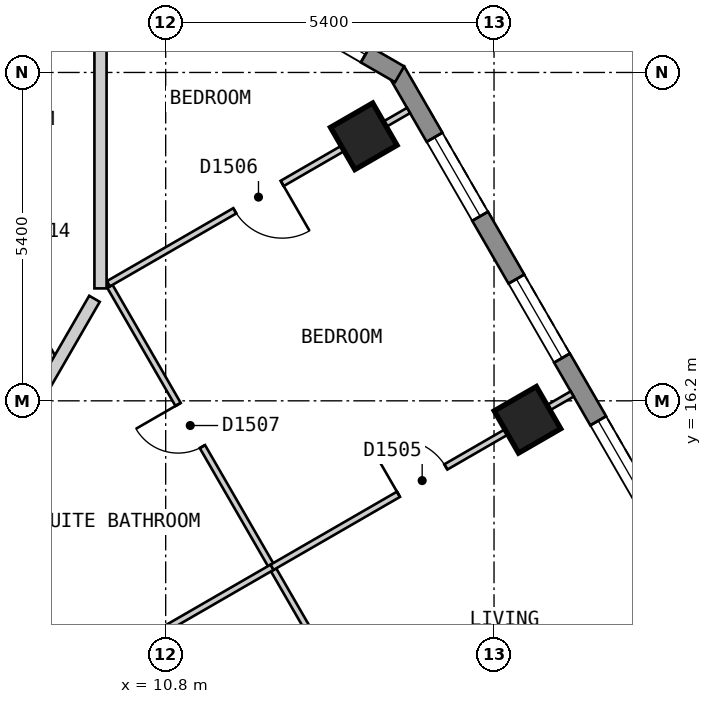
"""IFC4 building model, lengths in metres.
Left out: names, types, materials, properties, quantities, classifications, styles, units other than length and angle.
Written with IfcOpenShell. Run it as: python <this file> out.ifc"""

import sys

from ifc_helpers import new_model, si_unit, direction, frame, frame_2d, origin, origin_2d, place, context, subcontext, project, spatial, polyline, rectangle, outline, extrude, element, fill, save


model = new_model("IFC4")
c1 = context("Model", 3, precision=1e-05, world=origin(), true_north=direction((0.0, 1.0)))
c2 = subcontext(c1, "Body", "Model", "MODEL_VIEW")
j1 = project(units=[si_unit("LENGTHUNIT", "METRE"), si_unit("PLANEANGLEUNIT", "RADIAN")], contexts=[c1])
p1 = place(None, origin())
s1 = spatial("IfcSite", under=j1, at=p1, CompositionType="ELEMENT")
p2 = place(p1, origin())
s2 = spatial("IfcBuilding", under=s1, at=p2, CompositionType="ELEMENT")
p3 = place(p2, frame((0.0, 0.0, 184.2)))
s3 = spatial("IfcBuildingStorey", under=s2, at=p3, CompositionType="ELEMENT", Elevation=184.2)
for number, where, z_axis, x_axis in (
    (1, (16.75, 15.888, 0.0), (0.0, 0.0, 1.0), (-0.5, 0.866, 0.0)),
    (2, (14.058, 20.55, 0.0), (0.0, 0.0, 1.0), (-0.5, 0.866, 0.0)),
):
    element("IfcColumn", number, at=place(p3, frame(where, z_axis=z_axis, x_axis=x_axis)), inside=s3, PredefinedType="COLUMN", context=c2, shape_type="SweptSolid", body=[
        extrude(rectangle(XDim=0.8, YDim=0.8, at=origin_2d()), origin(), (0.0, 0.0, 1.0), 3.0),
    ])
p4 = place(p3, frame((26.024, 1.825, 0.0), z_axis=(0.0, 0.0, 1.0), x_axis=(-0.500010537973, 0.866019319597, 0.0)))
e3 = element("IfcWall", 3, at=p4, inside=s3, PredefinedType="SOLIDWALL", context=c2, shape_type="SweptSolid", body=[
    extrude(outline(polyline([(0.0, -0.15), (22.863, -0.15), (22.783, 0.15), (0.08, 0.15), (0.0, -0.15)])), origin(), (0.0, 0.0, 1.0), 2.7),
])
p5 = place(p4, frame((1.259, 0.0, 0.15)))
e4 = element("IfcOpeningElement", 4, at=p5, cuts=e3, PredefinedType="OPENING", context=c2, shape_type="SweptSolid", body=[
    extrude(rectangle(XDim=1.5, YDim=2.1, at=frame_2d((0.75, 1.05))), frame((0.0, 0.16, 0.0), z_axis=(0.0, -1.0, 0.0), x_axis=(1.0, 0.0, 0.0)), (0.0, 0.0, 1.0), 0.32),
])
p6 = place(p4, frame((3.952, 0.0, 0.15)))
e5 = element("IfcOpeningElement", 5, at=p6, cuts=e3, PredefinedType="OPENING", context=c2, shape_type="SweptSolid", body=[
    extrude(rectangle(XDim=1.5, YDim=2.1, at=frame_2d((0.75, 1.05))), frame((0.0, 0.16, 0.0), z_axis=(0.0, -1.0, 0.0), x_axis=(1.0, 0.0, 0.0)), (0.0, 0.0, 1.0), 0.32),
])
p7 = place(p4, frame((6.644, 0.0, 0.15)))
e6 = element("IfcOpeningElement", 6, at=p7, cuts=e3, PredefinedType="OPENING", context=c2, shape_type="SweptSolid", body=[
    extrude(rectangle(XDim=1.5, YDim=2.1, at=frame_2d((0.75, 1.05))), frame((0.0, 0.16, 0.0), z_axis=(0.0, -1.0, 0.0), x_axis=(1.0, 0.0, 0.0)), (0.0, 0.0, 1.0), 0.32),
])
p8 = place(p4, frame((9.335, 0.0, 0.15)))
e7 = element("IfcOpeningElement", 7, at=p8, cuts=e3, PredefinedType="OPENING", context=c2, shape_type="SweptSolid", body=[
    extrude(rectangle(XDim=1.5, YDim=2.1, at=frame_2d((0.75, 1.05))), frame((0.0, 0.16, 0.0), z_axis=(0.0, -1.0, 0.0), x_axis=(1.0, 0.0, 0.0)), (0.0, 0.0, 1.0), 0.32),
])
p9 = place(p4, frame((12.028, 0.0, 0.15)))
e8 = element("IfcOpeningElement", 8, at=p9, cuts=e3, PredefinedType="OPENING", context=c2, shape_type="SweptSolid", body=[
    extrude(rectangle(XDim=1.5, YDim=2.1, at=frame_2d((0.75, 1.05))), frame((0.0, 0.16, 0.0), z_axis=(0.0, -1.0, 0.0), x_axis=(1.0, 0.0, 0.0)), (0.0, 0.0, 1.0), 0.32),
])
p10 = place(p4, frame((14.72, 0.0, 0.15)))
e9 = element("IfcOpeningElement", 9, at=p10, cuts=e3, PredefinedType="OPENING", context=c2, shape_type="SweptSolid", body=[
    extrude(rectangle(XDim=1.5, YDim=2.1, at=frame_2d((0.75, 1.05))), frame((0.0, 0.16, 0.0), z_axis=(0.0, -1.0, 0.0), x_axis=(1.0, 0.0, 0.0)), (0.0, 0.0, 1.0), 0.32),
])
p11 = place(p4, frame((17.411, 0.0, 0.15)))
e10 = element("IfcOpeningElement", 10, at=p11, cuts=e3, PredefinedType="OPENING", context=c2, shape_type="SweptSolid", body=[
    extrude(rectangle(XDim=1.5, YDim=2.1, at=frame_2d((0.75, 1.05))), frame((0.0, 0.16, 0.0), z_axis=(0.0, -1.0, 0.0), x_axis=(1.0, 0.0, 0.0)), (0.0, 0.0, 1.0), 0.32),
])
p12 = place(p4, frame((20.104, 0.0, 0.15)))
e11 = element("IfcOpeningElement", 11, at=p12, cuts=e3, PredefinedType="OPENING", context=c2, shape_type="SweptSolid", body=[
    extrude(rectangle(XDim=1.5, YDim=2.1, at=frame_2d((0.75, 1.05))), frame((0.0, 0.16, 0.0), z_axis=(0.0, -1.0, 0.0), x_axis=(1.0, 0.0, 0.0)), (0.0, 0.0, 1.0), 0.32),
])
p13 = place(p3, frame((14.647, 21.57, 0.0), z_axis=(0.0, 0.0, 1.0), x_axis=(-0.866022959057, 0.500004234368, 0.0)))
e12 = element("IfcWall", 12, at=p13, inside=s3, PredefinedType="SOLIDWALL", context=c2, shape_type="SweptSolid", body=[
    extrude(outline(polyline([(0.0, -0.15), (5.0, -0.15), (4.92, 0.15), (0.08, 0.15), (0.0, -0.15)])), origin(), (0.0, 0.0, 1.0), 2.7),
])
p14 = place(p13, frame((0.65, 0.0, 0.15)))
e13 = element("IfcOpeningElement", 13, at=p14, cuts=e12, PredefinedType="OPENING", context=c2, shape_type="SweptSolid", body=[
    extrude(rectangle(XDim=1.2, YDim=2.1, at=frame_2d((0.6, 1.05))), frame((0.0, 0.16, 0.0), z_axis=(0.0, -1.0, 0.0), x_axis=(1.0, 0.0, 0.0)), (0.0, 0.0, 1.0), 0.32),
])
p15 = place(p13, frame((3.15, 0.0, 0.15)))
e14 = element("IfcOpeningElement", 14, at=p15, cuts=e12, PredefinedType="OPENING", context=c2, shape_type="SweptSolid", body=[
    extrude(rectangle(XDim=1.2, YDim=2.1, at=frame_2d((0.6, 1.05))), frame((0.0, 0.16, 0.0), z_axis=(0.0, -1.0, 0.0), x_axis=(1.0, 0.0, 0.0)), (0.0, 0.0, 1.0), 0.32),
])
p16 = place(p3, frame((5.485, 17.3, 0.0), z_axis=(0.0, 0.0, 1.0), x_axis=(0.499998905622, -0.866026035623, 0.0)))
e15 = element("IfcWall", 15, at=p16, inside=s3, PredefinedType="PARTITIONING", context=c2, shape_type="SweptSolid", body=[
    extrude(rectangle(XDim=10.524, YDim=0.2, at=frame_2d((5.262, 0.0))), origin(), (0.0, 0.0, 1.0), 2.7),
])
p17 = place(p16, frame((8.974, 0.0, 0.0)))
e16 = element("IfcOpeningElement", 16, at=p17, cuts=e15, PredefinedType="OPENING", context=c2, shape_type="SweptSolid", body=[
    extrude(rectangle(XDim=1.0, YDim=2.1, at=frame_2d((0.5, 1.05))), frame((0.0, 0.11, 0.0), z_axis=(0.0, -1.0, 0.0), x_axis=(1.0, 0.0, 0.0)), (0.0, 0.0, 1.0), 0.22),
])
p18 = place(p3, frame((7.073, 20.15, 0.0), z_axis=(0.0, 0.0, 1.0), x_axis=(0.499917691695, -0.866072919292, 0.0)))
e17 = element("IfcWall", 17, at=p18, inside=s3, PredefinedType="PARTITIONING", context=c2, shape_type="SweptSolid", body=[
    extrude(rectangle(XDim=3.753, YDim=0.1, at=frame_2d((1.876, 0.0))), origin(), (0.0, 0.0, 1.0), 2.7),
])
p19 = place(p18, frame((0.96, 0.0, 0.0)))
e18 = element("IfcOpeningElement", 18, at=p19, cuts=e17, PredefinedType="OPENING", context=c2, shape_type="SweptSolid", body=[
    extrude(rectangle(XDim=0.8, YDim=2.1, at=frame_2d((0.4, 1.05))), frame((0.0, 0.06, 0.0), z_axis=(0.0, -1.0, 0.0), x_axis=(1.0, 0.0, 0.0)), (0.0, 0.0, 1.0), 0.12),
])
p20 = place(p3, frame((9.883, 18.082, 0.0), z_axis=(0.0, 0.0, 1.0), x_axis=(0.500004428835, -0.86602284678, 0.0)))
e19 = element("IfcWall", 19, at=p20, inside=s3, PredefinedType="PARTITIONING", context=c2, shape_type="SweptSolid", body=[
    extrude(rectangle(XDim=10.618, YDim=0.1, at=frame_2d((5.309, 0.0))), origin(), (0.0, 0.0, 1.0), 2.7),
])
p21 = place(p20, frame((7.657, 0.0, 0.0)))
e20 = element("IfcOpeningElement", 20, at=p21, cuts=e19, PredefinedType="OPENING", context=c2, shape_type="SweptSolid", body=[
    extrude(rectangle(XDim=0.9, YDim=2.1, at=frame_2d((0.45, 1.05))), frame((0.0, 0.06, 0.0), z_axis=(0.0, -1.0, 0.0), x_axis=(1.0, 0.0, 0.0)), (0.0, 0.0, 1.0), 0.12),
])
p22 = place(p20, frame((2.242, 0.0, 0.0)))
e21 = element("IfcOpeningElement", 21, at=p22, cuts=e19, PredefinedType="OPENING", context=c2, shape_type="SweptSolid", body=[
    extrude(rectangle(XDim=0.8, YDim=2.1, at=frame_2d((0.4, 1.05))), frame((0.0, 0.06, 0.0), z_axis=(0.0, -1.0, 0.0), x_axis=(1.0, 0.0, 0.0)), (0.0, 0.0, 1.0), 0.12),
])
p23 = place(p3, frame((8.999, 11.413, 0.0), z_axis=(0.0, 0.0, 1.0), x_axis=(0.86606561423, 0.499930346997, 0.0)))
e22 = element("IfcWall", 22, at=p23, inside=s3, PredefinedType="PARTITIONING", context=c2, shape_type="SweptSolid", body=[
    extrude(rectangle(XDim=4.1, YDim=0.1, at=frame_2d((2.05, 0.0))), origin(), (0.0, 0.0, 1.0), 2.7),
])
p24 = place(p3, frame((9.858, 18.125, 0.0), z_axis=(0.0, 0.0, 1.0), x_axis=(0.866004402611, 0.500036373335, 0.0)))
e23 = element("IfcWall", 23, at=p24, inside=s3, PredefinedType="PARTITIONING", context=c2, shape_type="SweptSolid", body=[
    extrude(rectangle(XDim=5.7, YDim=0.1, at=frame_2d((2.85, 0.0))), origin(), (0.0, 0.0, 1.0), 2.7),
])
p25 = place(p24, frame((2.4, 0.0, 0.0)))
e24 = element("IfcOpeningElement", 24, at=p25, cuts=e23, PredefinedType="OPENING", context=c2, shape_type="SweptSolid", body=[
    extrude(rectangle(XDim=0.9, YDim=2.1, at=frame_2d((0.45, 1.05))), frame((0.0, 0.06, 0.0), z_axis=(0.0, -1.0, 0.0), x_axis=(1.0, 0.0, 0.0)), (0.0, 0.0, 1.0), 0.12),
])
p26 = place(p3, frame((7.448, 14.1, 0.0), z_axis=(0.0, 0.0, 1.0), x_axis=(0.499961462843, 0.866047652079, 0.0)))
e25 = element("IfcWall", 25, at=p26, inside=s3, PredefinedType="PARTITIONING", context=c2, shape_type="SweptSolid", body=[
    extrude(rectangle(XDim=4.362, YDim=0.2, at=frame_2d((2.181, 0.0))), origin(), (0.0, 0.0, 1.0), 2.7),
])
p27 = place(p3, frame((9.728, 18.049, 0.0), z_axis=(0.0, 0.0, 1.0), x_axis=(0.0, 1.0, 0.0)))
e26 = element("IfcWall", 26, at=p27, inside=s3, PredefinedType="PARTITIONING", context=c2, shape_type="SweptSolid", body=[
    extrude(rectangle(XDim=5.851, YDim=0.2, at=frame_2d((2.925, 0.0))), origin(), (0.0, 0.0, 1.0), 2.7),
])
p28 = place(p3, frame((12.55, 13.463, 0.0), z_axis=(0.0, 0.0, 1.0), x_axis=(0.866004402611, 0.500036373335, 0.0)))
e27 = element("IfcWall", 27, at=p28, inside=s3, PredefinedType="PARTITIONING", context=c2, shape_type="SweptSolid", body=[
    extrude(rectangle(XDim=5.7, YDim=0.1, at=frame_2d((2.85, 0.0))), origin(), (0.0, 0.0, 1.0), 2.7),
])
p29 = place(p28, frame((2.4, 0.0, 0.0)))
e28 = element("IfcOpeningElement", 28, at=p29, cuts=e27, PredefinedType="OPENING", context=c2, shape_type="SweptSolid", body=[
    extrude(rectangle(XDim=0.9, YDim=2.1, at=frame_2d((0.45, 1.05))), frame((0.0, 0.06, 0.0), z_axis=(0.0, -1.0, 0.0), x_axis=(1.0, 0.0, 0.0)), (0.0, 0.0, 1.0), 0.12),
])
p30 = place(p10, origin())
e29 = element("IfcWindow", 29, at=p30, inside=s3, PartitioningType="SINGLE_PANEL", PredefinedType="WINDOW", context=c2, shape_type="SweptSolid", body=[
    extrude(rectangle(XDim=1.5, YDim=2.1, at=frame_2d((0.75, 1.05))), frame((0.0, 0.03, 0.0), z_axis=(0.0, -1.0, 0.0), x_axis=(1.0, 0.0, 0.0)), (0.0, 0.0, 1.0), 0.06),
])
fill(e9, e29)
p31 = place(p11, origin())
e30 = element("IfcWindow", 30, at=p31, inside=s3, PartitioningType="SINGLE_PANEL", PredefinedType="WINDOW", context=c2, shape_type="SweptSolid", body=[
    extrude(rectangle(XDim=1.5, YDim=2.1, at=frame_2d((0.75, 1.05))), frame((0.0, 0.03, 0.0), z_axis=(0.0, -1.0, 0.0), x_axis=(1.0, 0.0, 0.0)), (0.0, 0.0, 1.0), 0.06),
])
fill(e10, e30)
p32 = place(p12, origin())
e31 = element("IfcWindow", 31, at=p32, inside=s3, PartitioningType="SINGLE_PANEL", PredefinedType="WINDOW", context=c2, shape_type="SweptSolid", body=[
    extrude(rectangle(XDim=1.5, YDim=2.1, at=frame_2d((0.75, 1.05))), frame((0.0, 0.03, 0.0), z_axis=(0.0, -1.0, 0.0), x_axis=(1.0, 0.0, 0.0)), (0.0, 0.0, 1.0), 0.06),
])
fill(e11, e31)
p33 = place(p14, origin())
e32 = element("IfcWindow", 32, at=p33, inside=s3, PartitioningType="SINGLE_PANEL", PredefinedType="WINDOW", context=c2, shape_type="SweptSolid", body=[
    extrude(rectangle(XDim=1.2, YDim=2.1, at=frame_2d((0.6, 1.05))), frame((0.0, 0.03, 0.0), z_axis=(0.0, -1.0, 0.0), x_axis=(1.0, 0.0, 0.0)), (0.0, 0.0, 1.0), 0.06),
])
fill(e13, e32)
p34 = place(p29, origin())
e33 = element("IfcDoor", 33, at=p34, inside=s3, OperationType="SINGLE_SWING_LEFT", PredefinedType="DOOR", context=c2, shape_type="SweptSolid", body=[
    extrude(rectangle(XDim=0.9, YDim=2.1, at=frame_2d((0.45, 1.05))), frame((0.0, 0.025, 0.0), z_axis=(0.0, -1.0, 0.0), x_axis=(1.0, 0.0, 0.0)), (0.0, 0.0, 1.0), 0.05),
])
fill(e28, e33)
p35 = place(p25, origin())
e34 = element("IfcDoor", 34, at=p35, inside=s3, OperationType="SINGLE_SWING_RIGHT", PredefinedType="DOOR", context=c2, shape_type="SweptSolid", body=[
    extrude(rectangle(XDim=0.9, YDim=2.1, at=frame_2d((0.45, 1.05))), frame((0.0, 0.025, 0.0), z_axis=(0.0, -1.0, 0.0), x_axis=(1.0, 0.0, 0.0)), (0.0, 0.0, 1.0), 0.05),
])
fill(e24, e34)
p36 = place(p22, origin())
e35 = element("IfcDoor", 35, at=p36, inside=s3, OperationType="SINGLE_SWING_LEFT", PredefinedType="DOOR", context=c2, shape_type="SweptSolid", body=[
    extrude(rectangle(XDim=0.8, YDim=2.1, at=frame_2d((0.4, 1.05))), frame((0.0, 0.025, 0.0), z_axis=(0.0, -1.0, 0.0), x_axis=(1.0, 0.0, 0.0)), (0.0, 0.0, 1.0), 0.05),
])
fill(e21, e35)
save(model, sys.argv[1])
